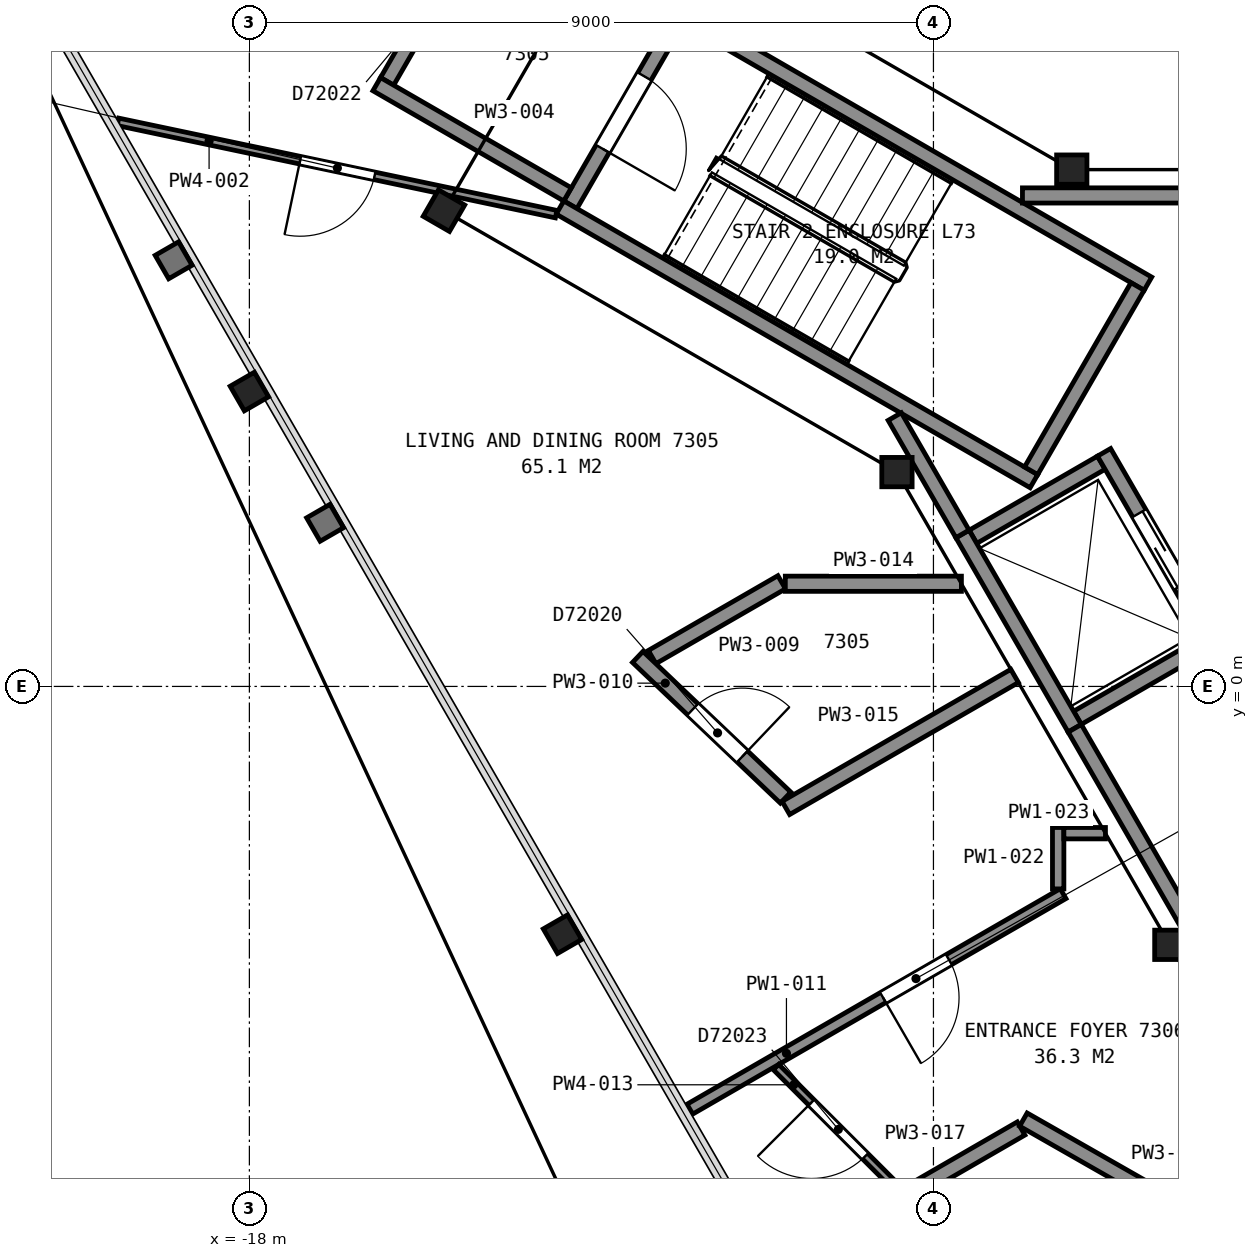
"""IFC4 building model, lengths in metres.
Left out: names, types, materials, properties, quantities, classifications, styles, units other than length and angle.
Written with IfcOpenShell. Run it as: python <this file> out.ifc"""

import sys

from ifc_helpers import new_model, si_unit, direction, frame, frame_2d, origin, origin_2d, place, context, subcontext, project, spatial, rectangle, i_section, extrude, element, fill, save


model = new_model("IFC4")
c1 = context("Model", 3, precision=1e-05, world=origin(), true_north=direction((0.0, 1.0)))
c2 = subcontext(c1, "Body", "Model", "MODEL_VIEW")
j1 = project(units=[si_unit("LENGTHUNIT", "METRE"), si_unit("PLANEANGLEUNIT", "RADIAN")], contexts=[c1])
p1 = place(None, origin())
s1 = spatial("IfcSite", under=j1, at=p1, CompositionType="ELEMENT")
p2 = place(p1, origin())
s2 = spatial("IfcBuilding", under=s1, at=p2, CompositionType="ELEMENT")
p3 = place(p2, frame((0.0, 0.0, 289.9)))
s3 = spatial("IfcBuildingStorey", under=s2, at=p3, CompositionType="ELEMENT", Elevation=289.9)
for number, where, z_axis, x_axis in (
    (1, (-18.0, 3.88, 0.0), (0.0, 0.0, 1.0), (-0.5, 0.866, 0.0)),
    (2, (-13.88, -3.26, 0.0), (0.0, 0.0, 1.0), (-0.5, 0.866, 0.0)),
):
    element("IfcColumn", number, at=place(p3, frame(where, z_axis=z_axis, x_axis=x_axis)), inside=s3, PredefinedType="COLUMN", context=c2, shape_type="SweptSolid", body=[
        extrude(i_section(OverallWidth=0.373, OverallDepth=0.368, WebThickness=0.015, FlangeThickness=0.024, FilletRadius=0.015, at=origin_2d()), origin(), (0.0, 0.0, 1.0), 3.7),
    ])
p4 = place(p3, frame((-7.18, 6.8, 0.0), z_axis=(0.0, 0.0, 1.0), x_axis=(1.0, 0.0, 0.0)))
e3 = element("IfcColumn", 3, at=p4, inside=s3, PredefinedType="COLUMN", context=c2, shape_type="SweptSolid", body=[
    extrude(i_section(OverallWidth=0.399, OverallDepth=0.386, WebThickness=0.021, FlangeThickness=0.033, FilletRadius=0.015, at=origin_2d()), origin(), (0.0, 0.0, 1.0), 3.7),
])
p5 = place(p3, frame((-15.44, 6.26, 0.0), z_axis=(0.0, 0.0, 1.0), x_axis=(0.5, 0.866025403784, 0.0)))
e4 = element("IfcColumn", 4, at=p5, inside=s3, PredefinedType="COLUMN", context=c2, shape_type="SweptSolid", body=[
    extrude(i_section(OverallWidth=0.401, OverallDepth=0.399, WebThickness=0.025, FlangeThickness=0.04, FilletRadius=0.015, at=origin_2d()), origin(), (0.0, 0.0, 1.0), 3.7),
])
for number, where, z_axis, x_axis in (
    (5, (-9.48, 2.82, 0.0), (0.0, 0.0, 1.0), (1.0, 0.0, 0.0)),
    (6, (-5.89, -3.4, 0.0), (0.0, 0.0, 1.0), (1.0, 0.0, 0.0)),
):
    element("IfcColumn", number, at=place(p3, frame(where, z_axis=z_axis, x_axis=x_axis)), inside=s3, PredefinedType="COLUMN", context=c2, shape_type="SweptSolid", body=[
        extrude(i_section(OverallWidth=0.399, OverallDepth=0.386, WebThickness=0.021, FlangeThickness=0.033, FilletRadius=0.015, at=origin_2d()), origin(), (0.0, 0.0, 1.0), 3.7),
    ])
p6 = place(p3, frame((-12.377, 8.762, 0.0), z_axis=(0.0, 0.0, 1.0), x_axis=(-0.500049511043, -0.865996816683, 0.0)))
e7 = element("IfcWall", 7, at=p6, inside=s3, PredefinedType="PARTITIONING", context=c2, shape_type="SweptSolid", body=[
    extrude(rectangle(XDim=2.8, YDim=0.2, at=frame_2d((1.4, 0.0))), origin(), (0.0, 0.0, 1.0), 3.45),
])
p7 = place(p6, frame((0.85, 0.0, 0.0)))
e8 = element("IfcOpeningElement", 8, at=p7, cuts=e7, PredefinedType="OPENING", context=c2, shape_type="SweptSolid", body=[
    extrude(rectangle(XDim=1.1, YDim=2.1, at=frame_2d((0.55, 1.05))), frame((0.0, 0.11, 0.0), z_axis=(0.0, -1.0, 0.0), x_axis=(1.0, 0.0, 0.0)), (0.0, 0.0, 1.0), 0.22),
])
for number, where, z_axis, x_axis in (
    (9, (-7.678, 2.701, 0.0), (0.0, 0.0, 1.0), (-0.866, 0.5, 0.0)),
    (10, (-6.178, 5.299, 0.0), (0.0, 0.0, 1.0), (-0.866, 0.5, 0.0)),
):
    element("IfcWall", number, at=place(p3, frame(where, z_axis=z_axis, x_axis=x_axis)), inside=s3, PredefinedType="PARTITIONING", context=c2, shape_type="SweptSolid", body=[
        extrude(rectangle(XDim=7.2, YDim=0.2, at=frame_2d((3.6, 0.0))), origin(), (0.0, 0.0, 1.0), 3.45),
    ])
p8 = place(p3, frame((-6.315, 5.262, 0.0), z_axis=(0.0, 0.0, 1.0), x_axis=(-0.500049511043, -0.865996816683, 0.0)))
e11 = element("IfcWall", 11, at=p8, inside=s3, PredefinedType="PARTITIONING", context=c2, shape_type="SweptSolid", body=[
    extrude(rectangle(XDim=2.8, YDim=0.2, at=frame_2d((1.4, 0.0))), origin(), (0.0, 0.0, 1.0), 3.45),
])
for number, where, z_axis, x_axis in (
    (12, (-7.105, -0.413, 0.0), (0.0, 0.0, 1.0), (0.866, 0.5, 0.0)),
    (13, (-8.48, 1.969, 0.0), (0.0, 0.0, 1.0), (0.866, 0.5, 0.0)),
):
    element("IfcWall", number, at=place(p3, frame(where, z_axis=z_axis, x_axis=x_axis)), inside=s3, PredefinedType="PARTITIONING", context=c2, shape_type="SweptSolid", body=[
        extrude(rectangle(XDim=1.95, YDim=0.2, at=frame_2d((0.975, 0.0))), origin(), (0.0, 0.0, 1.0), 3.7),
    ])
p9 = place(p3, frame((-5.28, 0.525, 0.0), z_axis=(0.0, 0.0, 1.0), x_axis=(-0.500037662692, 0.866003658127, 0.0)))
e14 = element("IfcWall", 14, at=p9, inside=s3, PredefinedType="PARTITIONING", context=c2, shape_type="SweptSolid", body=[
    extrude(rectangle(XDim=2.95, YDim=0.2, at=frame_2d((1.475, 0.0))), origin(), (0.0, 0.0, 1.0), 3.7),
])
p10 = place(p9, frame((0.925, 0.0, 0.0)))
e15 = element("IfcOpeningElement", 15, at=p10, cuts=e14, PredefinedType="OPENING", context=c2, shape_type="SweptSolid", body=[
    extrude(rectangle(XDim=1.1, YDim=2.1, at=frame_2d((0.55, 1.05))), frame((0.0, 0.11, 0.0), z_axis=(0.0, -1.0, 0.0), x_axis=(1.0, 0.0, 0.0)), (0.0, 0.0, 1.0), 0.22),
])
p11 = place(p3, frame((-7.142, -0.55, 0.0), z_axis=(0.0, 0.0, 1.0), x_axis=(-0.49997559174, 0.866039495442, 0.0)))
e16 = element("IfcWall", 16, at=p11, inside=s3, PredefinedType="PARTITIONING", context=c2, shape_type="SweptSolid", body=[
    extrude(rectangle(XDim=2.95, YDim=0.2, at=frame_2d((1.475, 0.0))), origin(), (0.0, 0.0, 1.0), 3.7),
])
p12 = place(p3, frame((-9.509, 3.551, 0.0), z_axis=(0.0, 0.0, 1.0), x_axis=(0.499999136801, -0.866025902152, 0.0)))
e17 = element("IfcWall", 17, at=p12, inside=s3, PredefinedType="PARTITIONING", context=c2, shape_type="SweptSolid", body=[
    extrude(rectangle(XDim=1.782, YDim=0.2, at=frame_2d((0.891, 0.0))), origin(), (0.0, 0.0, 1.0), 3.45),
])
p13 = place(p3, frame((7.829, 6.46, 0.0), z_axis=(0.0, 0.0, 1.0), x_axis=(-1.0, 0.0, 0.0)))
e18 = element("IfcWall", 18, at=p13, inside=s3, PredefinedType="PARTITIONING", context=c2, shape_type="SweptSolid", body=[
    extrude(rectangle(XDim=15.658, YDim=0.2, at=frame_2d((7.829, 0.0))), origin(), (0.0, 0.0, 1.0), 3.45),
])
p14 = place(p13, frame((12.168, 0.0, 0.0)))
e19 = element("IfcOpeningElement", 19, at=p14, cuts=e18, PredefinedType="OPENING", context=c2, shape_type="SweptSolid", body=[
    extrude(rectangle(XDim=1.2, YDim=2.1, at=frame_2d((0.6, 1.05))), frame((0.0, 0.11, 0.0), z_axis=(0.0, -1.0, 0.0), x_axis=(1.0, 0.0, 0.0)), (0.0, 0.0, 1.0), 0.22),
])
p15 = place(p3, frame((-7.141, -0.551, 0.0), z_axis=(0.0, 0.0, 1.0), x_axis=(0.500001302854, -0.86602465158, 0.0)))
e20 = element("IfcWall", 20, at=p15, inside=s3, PredefinedType="PARTITIONING", context=c2, shape_type="SweptSolid", body=[
    extrude(rectangle(XDim=6.846, YDim=0.2, at=frame_2d((3.423, 0.0))), origin(), (0.0, 0.0, 1.0), 3.45),
])
p16 = place(p15, frame((5.0, 0.0, 0.0)))
e21 = element("IfcOpeningElement", 21, at=p16, cuts=e20, PredefinedType="OPENING", context=c2, shape_type="SweptSolid", body=[
    extrude(rectangle(XDim=1.2, YDim=2.1, at=frame_2d((0.6, 1.05))), frame((0.0, 0.11, 0.0), z_axis=(0.0, -1.0, 0.0), x_axis=(1.0, 0.0, 0.0)), (0.0, 0.0, 1.0), 0.22),
])
p17 = place(p3, frame((-19.729, 7.428, 0.0), z_axis=(0.0, 0.0, 1.0), x_axis=(0.97852427483, -0.206131617102, 0.0)))
e22 = element("IfcWall", 22, at=p17, inside=s3, PredefinedType="PARTITIONING", context=c2, shape_type="SweptSolid", body=[
    extrude(rectangle(XDim=5.891, YDim=0.1, at=frame_2d((2.946, 0.0))), origin(), (0.0, 0.0, 1.0), 2.723),
])
p18 = place(p17, frame((2.45, 0.0, 0.0)))
e23 = element("IfcOpeningElement", 23, at=p18, cuts=e22, PredefinedType="OPENING", context=c2, shape_type="SweptSolid", body=[
    extrude(rectangle(XDim=1.0, YDim=2.1, at=frame_2d((0.5, 1.05))), frame((0.0, 0.06, 0.0), z_axis=(0.0, -1.0, 0.0), x_axis=(1.0, 0.0, 0.0)), (0.0, 0.0, 1.0), 0.12),
])
p19 = place(p3, frame((-14.985, 10.045, 0.0), z_axis=(0.0, 0.0, 1.0), x_axis=(-0.499903970786, -0.866080839178, 0.0)))
e24 = element("IfcWall", 24, at=p19, inside=s3, PredefinedType="PARTITIONING", context=c2, shape_type="SweptSolid", body=[
    extrude(rectangle(XDim=2.406, YDim=0.2, at=frame_2d((1.203, 0.0))), origin(), (0.0, 0.0, 1.0), 2.723),
])
p20 = place(p19, frame((0.806, 0.0, 0.0)))
e25 = element("IfcOpeningElement", 25, at=p20, cuts=e24, PredefinedType="OPENING", context=c2, shape_type="SweptSolid", body=[
    extrude(rectangle(XDim=0.8, YDim=2.1, at=frame_2d((0.4, 1.05))), frame((0.0, 0.11, 0.0), z_axis=(0.0, -1.0, 0.0), x_axis=(1.0, 0.0, 0.0)), (0.0, 0.0, 1.0), 0.22),
])
p21 = place(p3, frame((-16.325, 7.924, 0.0), z_axis=(0.0, 0.0, 1.0), x_axis=(0.865969617579, -0.500096612097, 0.0)))
e26 = element("IfcWall", 26, at=p21, inside=s3, PredefinedType="PARTITIONING", context=c2, shape_type="SweptSolid", body=[
    extrude(rectangle(XDim=2.899, YDim=0.2, at=frame_2d((1.45, 0.0))), origin(), (0.0, 0.0, 1.0), 2.723),
])
p22 = place(p3, frame((-12.701, 0.386, 0.0), z_axis=(0.0, 0.0, 1.0), x_axis=(0.866028603765, 0.49999445743, 0.0)))
e27 = element("IfcWall", 27, at=p22, inside=s3, PredefinedType="PARTITIONING", context=c2, shape_type="SweptSolid", body=[
    extrude(rectangle(XDim=1.968, YDim=0.2, at=frame_2d((0.984, 0.0))), origin(), (0.0, 0.0, 1.0), 2.723),
])
p23 = place(p3, frame((-12.89, 0.388, 0.0), z_axis=(0.0, 0.0, 1.0), x_axis=(0.724395225918, -0.689384911836, 0.0)))
e28 = element("IfcWall", 28, at=p23, inside=s3, PredefinedType="PARTITIONING", context=c2, shape_type="SweptSolid", body=[
    extrude(rectangle(XDim=2.685, YDim=0.2, at=frame_2d((1.342, 0.0))), origin(), (0.0, 0.0, 1.0), 2.723),
])
p24 = place(p23, frame((1.0, 0.0, 0.0)))
e29 = element("IfcOpeningElement", 29, at=p24, cuts=e28, PredefinedType="OPENING", context=c2, shape_type="SweptSolid", body=[
    extrude(rectangle(XDim=0.9, YDim=2.1, at=frame_2d((0.45, 1.05))), frame((0.0, 0.11, 0.0), z_axis=(0.0, -1.0, 0.0), x_axis=(1.0, 0.0, 0.0)), (0.0, 0.0, 1.0), 0.22),
])
p25 = place(p3, frame((-12.205, -5.562, 0.0), z_axis=(0.0, 0.0, 1.0), x_axis=(0.866006351856, 0.500032997455, 0.0)))
e30 = element("IfcWall", 30, at=p25, inside=s3, PredefinedType="PARTITIONING", context=c2, shape_type="SweptSolid", body=[
    extrude(rectangle(XDim=5.671, YDim=0.15, at=frame_2d((2.835, 0.0))), origin(), (0.0, 0.0, 1.0), 2.723),
])
p26 = place(p25, frame((2.935, 0.0, 0.0)))
e31 = element("IfcOpeningElement", 31, at=p26, cuts=e30, PredefinedType="OPENING", context=c2, shape_type="SweptSolid", body=[
    extrude(rectangle(XDim=1.0, YDim=2.1, at=frame_2d((0.5, 1.05))), frame((0.0, 0.085, 0.0), z_axis=(0.0, -1.0, 0.0), x_axis=(1.0, 0.0, 0.0)), (0.0, 0.0, 1.0), 0.17),
])
p27 = place(p3, frame((-9.452, -6.627, 0.0), z_axis=(0.0, 0.0, 1.0), x_axis=(-0.707106781187, 0.707106781187, 0.0)))
e32 = element("IfcWall", 32, at=p27, inside=s3, PredefinedType="PARTITIONING", context=c2, shape_type="SweptSolid", body=[
    extrude(rectangle(XDim=2.289, YDim=0.1, at=frame_2d((1.145, 0.0))), origin(), (0.0, 0.0, 1.0), 2.723),
])
p28 = place(p27, frame((0.63, 0.0, 0.0)))
e33 = element("IfcOpeningElement", 33, at=p28, cuts=e32, PredefinedType="OPENING", context=c2, shape_type="SweptSolid", body=[
    extrude(rectangle(XDim=1.0, YDim=2.1, at=frame_2d((0.5, 1.05))), frame((0.0, 0.06, 0.0), z_axis=(0.0, -1.0, 0.0), x_axis=(1.0, 0.0, 0.0)), (0.0, 0.0, 1.0), 0.12),
])
p29 = place(p3, frame((-10.949, 1.351, 0.0), z_axis=(0.0, 0.0, 1.0), x_axis=(1.0, 0.0, 0.0)))
e34 = element("IfcWall", 34, at=p29, inside=s3, PredefinedType="PARTITIONING", context=c2, shape_type="SweptSolid", body=[
    extrude(rectangle(XDim=2.317, YDim=0.2, at=frame_2d((1.158, 0.0))), origin(), (0.0, 0.0, 1.0), 2.723),
])
p30 = place(p3, frame((-10.942, -1.599, 0.0), z_axis=(0.0, 0.0, 1.0), x_axis=(0.866134116492, 0.499811656775, 0.0)))
e35 = element("IfcWall", 35, at=p30, inside=s3, PredefinedType="PARTITIONING", context=c2, shape_type="SweptSolid", body=[
    extrude(rectangle(XDim=3.475, YDim=0.2, at=frame_2d((1.737, 0.0))), origin(), (0.0, 0.0, 1.0), 2.723),
])
p31 = place(p3, frame((-9.27, -6.638, 0.0), z_axis=(0.0, 0.0, 1.0), x_axis=(0.865883664904, 0.500245418622, 0.0)))
e36 = element("IfcWall", 36, at=p31, inside=s3, PredefinedType="PARTITIONING", context=c2, shape_type="SweptSolid", body=[
    extrude(rectangle(XDim=1.643, YDim=0.2, at=frame_2d((0.822, 0.0))), origin(), (0.0, 0.0, 1.0), 2.723),
])
p32 = place(p3, frame((-7.817, -5.699, 0.0), z_axis=(0.0, 0.0, 1.0), x_axis=(0.868528315933, -0.495639550906, 0.0)))
e37 = element("IfcWall", 37, at=p32, inside=s3, PredefinedType="PARTITIONING", context=c2, shape_type="SweptSolid", body=[
    extrude(rectangle(XDim=3.212, YDim=0.2, at=frame_2d((1.606, 0.0))), origin(), (0.0, 0.0, 1.0), 2.723),
])
p33 = place(p3, frame((-7.359, -2.664, 0.0), z_axis=(0.0, 0.0, 1.0), x_axis=(0.0, 1.0, 0.0)))
e38 = element("IfcWall", 38, at=p33, inside=s3, PredefinedType="PARTITIONING", context=c2, shape_type="SweptSolid", body=[
    extrude(rectangle(XDim=0.808, YDim=0.15, at=frame_2d((0.404, 0.0))), origin(), (0.0, 0.0, 1.0), 2.723),
])
p34 = place(p3, frame((-7.284, -1.931, 0.0), z_axis=(0.0, 0.0, 1.0), x_axis=(1.0, 0.0, 0.0)))
e39 = element("IfcWall", 39, at=p34, inside=s3, PredefinedType="PARTITIONING", context=c2, shape_type="SweptSolid", body=[
    extrude(rectangle(XDim=0.547, YDim=0.15, at=frame_2d((0.273, 0.0))), origin(), (0.0, 0.0, 1.0), 2.723),
])
p35 = place(p7, origin())
e40 = element("IfcDoor", 40, at=p35, inside=s3, OperationType="SINGLE_SWING_RIGHT", PredefinedType="DOOR", context=c2, shape_type="SweptSolid", body=[
    extrude(rectangle(XDim=1.1, YDim=2.1, at=frame_2d((0.55, 1.05))), frame((0.0, 0.025, 0.0), z_axis=(0.0, -1.0, 0.0), x_axis=(1.0, 0.0, 0.0)), (0.0, 0.0, 1.0), 0.05),
])
fill(e8, e40)
p36 = place(p10, origin())
e41 = element("IfcDoor", 41, at=p36, inside=s3, OperationType="SLIDING_TO_LEFT", PredefinedType="DOOR", context=c2, shape_type="SweptSolid", body=[
    extrude(rectangle(XDim=1.1, YDim=2.1, at=frame_2d((0.55, 1.05))), frame((0.0, 0.025, 0.0), z_axis=(0.0, -1.0, 0.0), x_axis=(1.0, 0.0, 0.0)), (0.0, 0.0, 1.0), 0.05),
])
fill(e15, e41)
p37 = place(p18, origin())
e42 = element("IfcDoor", 42, at=p37, inside=s3, OperationType="SINGLE_SWING_LEFT", PredefinedType="DOOR", context=c2, shape_type="SweptSolid", body=[
    extrude(rectangle(XDim=1.0, YDim=2.1, at=frame_2d((0.5, 1.05))), frame((0.0, 0.025, 0.0), z_axis=(0.0, -1.0, 0.0), x_axis=(1.0, 0.0, 0.0)), (0.0, 0.0, 1.0), 0.05),
])
fill(e23, e42)
p38 = place(p24, origin())
e43 = element("IfcDoor", 43, at=p38, inside=s3, OperationType="SINGLE_SWING_RIGHT", PredefinedType="DOOR", context=c2, shape_type="SweptSolid", body=[
    extrude(rectangle(XDim=0.9, YDim=2.1, at=frame_2d((0.45, 1.05))), frame((0.0, 0.025, 0.0), z_axis=(0.0, -1.0, 0.0), x_axis=(1.0, 0.0, 0.0)), (0.0, 0.0, 1.0), 0.05),
])
fill(e29, e43)
p39 = place(p26, origin())
e44 = element("IfcDoor", 44, at=p39, inside=s3, OperationType="SINGLE_SWING_LEFT", PredefinedType="DOOR", context=c2, shape_type="SweptSolid", body=[
    extrude(rectangle(XDim=1.0, YDim=2.1, at=frame_2d((0.5, 1.05))), frame((0.0, 0.025, 0.0), z_axis=(0.0, -1.0, 0.0), x_axis=(1.0, 0.0, 0.0)), (0.0, 0.0, 1.0), 0.05),
])
fill(e31, e44)
p40 = place(p28, origin())
e45 = element("IfcDoor", 45, at=p40, inside=s3, OperationType="SINGLE_SWING_RIGHT", PredefinedType="DOOR", context=c2, shape_type="SweptSolid", body=[
    extrude(rectangle(XDim=1.0, YDim=2.1, at=frame_2d((0.5, 1.05))), frame((0.0, 0.025, 0.0), z_axis=(0.0, -1.0, 0.0), x_axis=(1.0, 0.0, 0.0)), (0.0, 0.0, 1.0), 0.05),
])
fill(e33, e45)
save(model, sys.argv[1])
